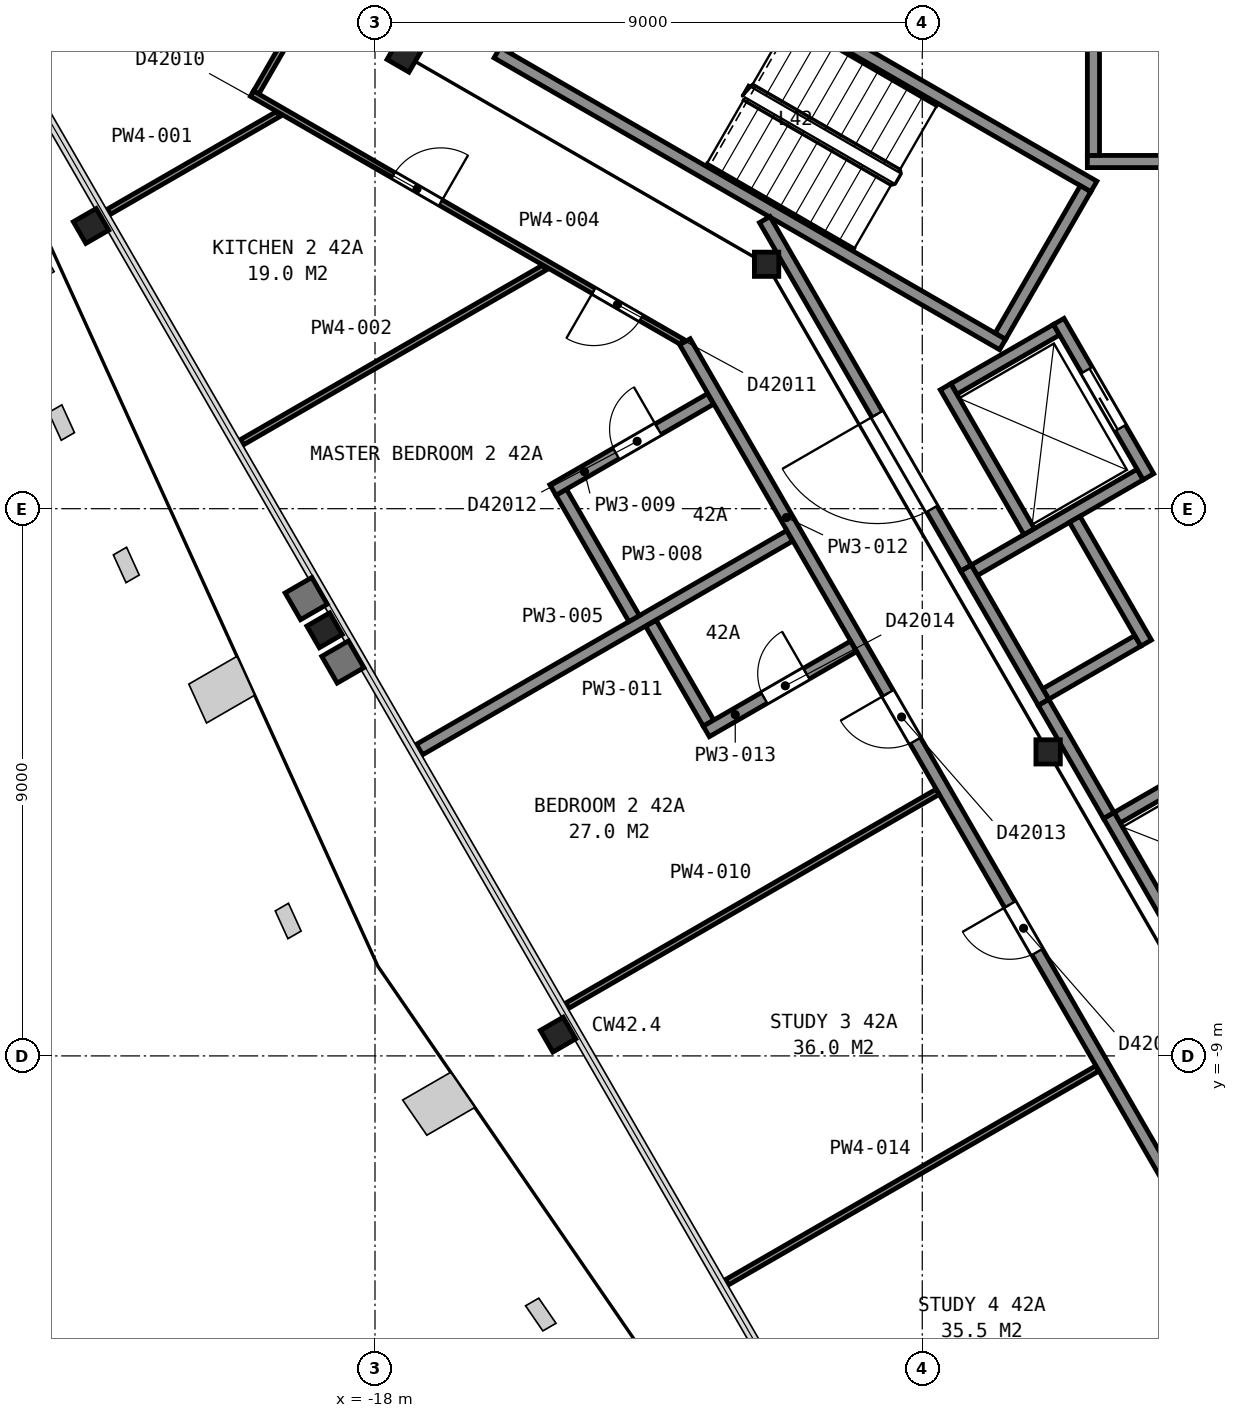
"""IFC4 building model, lengths in metres.
Left out: names, types, materials, properties, quantities, classifications, styles, units other than length and angle.
Written with IfcOpenShell. Run it as: python <this file> out.ifc"""

import sys

from ifc_helpers import new_model, si_unit, direction, frame, frame_2d, origin, origin_2d, place, context, subcontext, project, spatial, rectangle, i_section, extrude, element, fill, save


model = new_model("IFC4")
c1 = context("Model", 3, precision=1e-05, world=origin(), true_north=direction((0.0, 1.0)))
c2 = subcontext(c1, "Body", "Model", "MODEL_VIEW")
j1 = project(units=[si_unit("LENGTHUNIT", "METRE"), si_unit("PLANEANGLEUNIT", "RADIAN")], contexts=[c1])
p1 = place(None, origin())
s1 = spatial("IfcSite", under=j1, at=p1, CompositionType="ELEMENT")
p2 = place(p1, origin())
s2 = spatial("IfcBuilding", under=s1, at=p2, CompositionType="ELEMENT")
p3 = place(p2, frame((0.0, 0.0, 171.0)))
s3 = spatial("IfcBuildingStorey", under=s2, at=p3, CompositionType="ELEMENT", Elevation=171.0)
p4 = place(p3, frame((-22.67, 4.65, 0.0), z_axis=(0.0, 0.0, 1.0), x_axis=(-0.5, 0.866025403784, 0.0)))
e1 = element("IfcColumn", 1, at=p4, inside=s3, PredefinedType="COLUMN", context=c2, shape_type="SweptSolid", body=[
    extrude(i_section(OverallWidth=0.411, OverallDepth=0.434, WebThickness=0.036, FlangeThickness=0.057, FilletRadius=0.015, at=origin_2d()), origin(), (0.0, 0.0, 1.0), 3.66),
])
for number, where, z_axis, x_axis in (
    (2, (-18.83, -2.0, 0.0), (0.0, 0.0, 1.0), (-0.5, 0.866, 0.0)),
    (3, (-14.99, -8.65, 0.0), (0.0, 0.0, 1.0), (-0.5, 0.866, 0.0)),
):
    element("IfcColumn", number, at=place(p3, frame(where, z_axis=z_axis, x_axis=x_axis)), inside=s3, PredefinedType="COLUMN", context=c2, shape_type="SweptSolid", body=[
        extrude(i_section(OverallWidth=0.411, OverallDepth=0.434, WebThickness=0.036, FlangeThickness=0.057, FilletRadius=0.015, at=origin_2d()), origin(), (0.0, 0.0, 1.0), 3.665),
    ])
p5 = place(p3, frame((-17.52, 7.46, 0.0), z_axis=(0.0, 0.0, 1.0), x_axis=(0.5, 0.866025403784, 0.0)))
e4 = element("IfcColumn", 4, at=p5, inside=s3, PredefinedType="COLUMN", context=c2, shape_type="SweptSolid", body=[
    extrude(i_section(OverallWidth=0.406, OverallDepth=0.417, WebThickness=0.03, FlangeThickness=0.048, FilletRadius=0.015, at=origin_2d()), origin(), (0.0, 0.0, 1.0), 3.7),
])
for number, where, z_axis, x_axis in (
    (5, (-11.56, 4.02, 0.0), (0.0, 0.0, 1.0), (1.0, 0.0, 0.0)),
    (6, (-6.93, -4.0, 0.0), (0.0, 0.0, 1.0), (1.0, 0.0, 0.0)),
):
    element("IfcColumn", number, at=place(p3, frame(where, z_axis=z_axis, x_axis=x_axis)), inside=s3, PredefinedType="COLUMN", context=c2, shape_type="SweptSolid", body=[
        extrude(i_section(OverallWidth=0.401, OverallDepth=0.399, WebThickness=0.025, FlangeThickness=0.04, FilletRadius=0.015, at=origin_2d()), origin(), (0.0, 0.0, 1.0), 3.7),
    ])
p6 = place(p3, frame((-14.455, 9.962, 0.0), z_axis=(0.0, 0.0, 1.0), x_axis=(-0.500049511043, -0.865996816683, 0.0)))
e7 = element("IfcWall", 7, at=p6, inside=s3, PredefinedType="PARTITIONING", context=c2, shape_type="SweptSolid", body=[
    extrude(rectangle(XDim=2.8, YDim=0.2, at=frame_2d((1.4, 0.0))), origin(), (0.0, 0.0, 1.0), 3.45),
])
p7 = place(p6, frame((0.85, 0.0, 0.0)))
e8 = element("IfcOpeningElement", 8, at=p7, cuts=e7, PredefinedType="OPENING", context=c2, shape_type="SweptSolid", body=[
    extrude(rectangle(XDim=1.1, YDim=2.1, at=frame_2d((0.55, 1.05))), frame((0.0, 0.11, 0.0), z_axis=(0.0, -1.0, 0.0), x_axis=(1.0, 0.0, 0.0)), (0.0, 0.0, 1.0), 0.22),
])
for number, where, z_axis, x_axis in (
    (9, (-7.678, 2.701, 0.0), (0.0, 0.0, 1.0), (-0.866, 0.5, 0.0)),
    (10, (-6.178, 5.299, 0.0), (0.0, 0.0, 1.0), (-0.866, 0.5, 0.0)),
):
    element("IfcWall", number, at=place(p3, frame(where, z_axis=z_axis, x_axis=x_axis)), inside=s3, PredefinedType="PARTITIONING", context=c2, shape_type="SweptSolid", body=[
        extrude(rectangle(XDim=9.6, YDim=0.2, at=frame_2d((4.8, 0.0))), origin(), (0.0, 0.0, 1.0), 3.45),
    ])
p8 = place(p3, frame((-6.315, 5.262, 0.0), z_axis=(0.0, 0.0, 1.0), x_axis=(-0.500049511043, -0.865996816683, 0.0)))
e11 = element("IfcWall", 11, at=p8, inside=s3, PredefinedType="PARTITIONING", context=c2, shape_type="SweptSolid", body=[
    extrude(rectangle(XDim=2.8, YDim=0.2, at=frame_2d((1.4, 0.0))), origin(), (0.0, 0.0, 1.0), 3.45),
])
p9 = place(p3, frame((-6.285, 5.71, 0.0), z_axis=(0.0, 0.0, 1.0), x_axis=(1.0, 0.0, 0.0)))
e12 = element("IfcWall", 12, at=p9, inside=s3, PredefinedType="PARTITIONING", context=c2, shape_type="SweptSolid", body=[
    extrude(rectangle(XDim=2.35, YDim=0.2, at=frame_2d((1.175, 0.0))), origin(), (0.0, 0.0, 1.0), 3.7),
])
for number, where, z_axis, x_axis in (
    (13, (-5.795, -5.083, 0.0), (0.0, 0.0, 1.0), (0.866, 0.5, 0.0)),
    (14, (-6.97, -3.048, 0.0), (0.0, 0.0, 1.0), (0.866, 0.5, 0.0)),
):
    element("IfcWall", number, at=place(p3, frame(where, z_axis=z_axis, x_axis=x_axis)), inside=s3, PredefinedType="PARTITIONING", context=c2, shape_type="SweptSolid", body=[
        extrude(rectangle(XDim=1.75, YDim=0.2, at=frame_2d((0.875, 0.0))), origin(), (0.0, 0.0, 1.0), 3.7),
    ])
p10 = place(p3, frame((-8.145, -1.013, 0.0), z_axis=(0.0, 0.0, 1.0), x_axis=(0.866016494683, 0.500015430699, 0.0)))
e15 = element("IfcWall", 15, at=p10, inside=s3, PredefinedType="PARTITIONING", context=c2, shape_type="SweptSolid", body=[
    extrude(rectangle(XDim=3.15, YDim=0.2, at=frame_2d((1.575, 0.0))), origin(), (0.0, 0.0, 1.0), 3.7),
])
p11 = place(p3, frame((-8.48, 1.969, 0.0), z_axis=(0.0, 0.0, 1.0), x_axis=(0.866000020948, 0.500043961785, 0.0)))
e16 = element("IfcWall", 16, at=p11, inside=s3, PredefinedType="PARTITIONING", context=c2, shape_type="SweptSolid", body=[
    extrude(rectangle(XDim=1.95, YDim=0.2, at=frame_2d((0.975, 0.0))), origin(), (0.0, 0.0, 1.0), 3.7),
])
p12 = place(p3, frame((-6.185, 5.81, 0.0), z_axis=(0.0, 0.0, 1.0), x_axis=(0.0, 1.0, 0.0)))
e17 = element("IfcWall", 17, at=p12, inside=s3, PredefinedType="PARTITIONING", context=c2, shape_type="SweptSolid", body=[
    extrude(rectangle(XDim=1.75, YDim=0.2, at=frame_2d((0.875, 0.0))), origin(), (0.0, 0.0, 1.0), 3.7),
])
p13 = place(p3, frame((-5.28, 0.525, 0.0), z_axis=(0.0, 0.0, 1.0), x_axis=(-0.500037662692, 0.866003658127, 0.0)))
e18 = element("IfcWall", 18, at=p13, inside=s3, PredefinedType="PARTITIONING", context=c2, shape_type="SweptSolid", body=[
    extrude(rectangle(XDim=2.95, YDim=0.2, at=frame_2d((1.475, 0.0))), origin(), (0.0, 0.0, 1.0), 3.7),
])
p14 = place(p13, frame((0.925, 0.0, 0.0)))
e19 = element("IfcOpeningElement", 19, at=p14, cuts=e18, PredefinedType="OPENING", context=c2, shape_type="SweptSolid", body=[
    extrude(rectangle(XDim=1.1, YDim=2.1, at=frame_2d((0.55, 1.05))), frame((0.0, 0.11, 0.0), z_axis=(0.0, -1.0, 0.0), x_axis=(1.0, 0.0, 0.0)), (0.0, 0.0, 1.0), 0.22),
])
p15 = place(p3, frame((-5.318, -2.21, 0.0), z_axis=(0.0, 0.0, 1.0), x_axis=(-0.499938297808, 0.866061024631, 0.0)))
e20 = element("IfcWall", 20, at=p15, inside=s3, PredefinedType="PARTITIONING", context=c2, shape_type="SweptSolid", body=[
    extrude(rectangle(XDim=2.35, YDim=0.2, at=frame_2d((1.175, 0.0))), origin(), (0.0, 0.0, 1.0), 3.7),
])
p16 = place(p3, frame((-7.242, -0.376, 0.0), z_axis=(0.0, 0.0, 1.0), x_axis=(-0.499996545922, 0.866027397988, 0.0)))
e21 = element("IfcWall", 21, at=p16, inside=s3, PredefinedType="PARTITIONING", context=c2, shape_type="SweptSolid", body=[
    extrude(rectangle(XDim=2.75, YDim=0.2, at=frame_2d((1.375, 0.0))), origin(), (0.0, 0.0, 1.0), 3.7),
])
for number, where, z_axis, x_axis in (
    (22, (-4.656, -7.255, 0.0), (0.0, 0.0, 1.0), (-0.5, 0.866, 0.0)),
    (23, (-7.006, -3.185, 0.0), (0.0, 0.0, 1.0), (-0.5, 0.866, 0.0)),
):
    element("IfcWall", number, at=place(p3, frame(where, z_axis=z_axis, x_axis=x_axis)), inside=s3, PredefinedType="PARTITIONING", context=c2, shape_type="SweptSolid", body=[
        extrude(rectangle(XDim=2.55, YDim=0.2, at=frame_2d((1.275, 0.0))), origin(), (0.0, 0.0, 1.0), 3.7),
    ])
p17 = place(p3, frame((-11.591, 4.755, 0.0), z_axis=(0.0, 0.0, 1.0), x_axis=(0.500043977787, -0.866000011708, 0.0)))
e24 = element("IfcWall", 24, at=p17, inside=s3, PredefinedType="PARTITIONING", context=c2, shape_type="SweptSolid", body=[
    extrude(rectangle(XDim=6.617, YDim=0.2, at=frame_2d((3.308, 0.0))), origin(), (0.0, 0.0, 1.0), 3.45),
])
p18 = place(p17, frame((3.695, 0.0, 0.0)))
e25 = element("IfcOpeningElement", 25, at=p18, cuts=e24, PredefinedType="OPENING", context=c2, shape_type="SweptSolid", body=[
    extrude(rectangle(XDim=1.8, YDim=2.1, at=frame_2d((0.9, 1.05))), frame((0.0, 0.11, 0.0), z_axis=(0.0, -1.0, 0.0), x_axis=(1.0, 0.0, 0.0)), (0.0, 0.0, 1.0), 0.22),
])
p19 = place(p3, frame((-7.005, -3.187, 0.0), z_axis=(0.0, 0.0, 1.0), x_axis=(0.499689606989, -0.866204535123, 0.0)))
e26 = element("IfcWall", 26, at=p19, inside=s3, PredefinedType="PARTITIONING", context=c2, shape_type="SweptSolid", body=[
    extrude(rectangle(XDim=2.145, YDim=0.2, at=frame_2d((1.072, 0.0))), origin(), (0.0, 0.0, 1.0), 3.45),
])
p20 = place(p3, frame((-22.375, 4.885, 0.0), z_axis=(0.0, 0.0, 1.0), x_axis=(0.866164079783, 0.499759729163, 0.0)))
e27 = element("IfcWall", 27, at=p20, inside=s3, PredefinedType="PARTITIONING", context=c2, shape_type="SweptSolid", body=[
    extrude(rectangle(XDim=3.213, YDim=0.1, at=frame_2d((1.606, 0.0))), origin(), (0.0, 0.0, 1.0), 2.713),
])
p21 = place(p3, frame((-20.187, 1.094, 0.0), z_axis=(0.0, 0.0, 1.0), x_axis=(0.866060256018, 0.499939629302, 0.0)))
e28 = element("IfcWall", 28, at=p21, inside=s3, PredefinedType="PARTITIONING", context=c2, shape_type="SweptSolid", body=[
    extrude(rectangle(XDim=5.741, YDim=0.1, at=frame_2d((2.871, 0.0))), origin(), (0.0, 0.0, 1.0), 2.713),
])
p22 = place(p3, frame((-19.955, 6.844, 0.0), z_axis=(0.0, 0.0, 1.0), x_axis=(0.500415732313, 0.865785247537, 0.0)))
e29 = element("IfcWall", 29, at=p22, inside=s3, PredefinedType="PARTITIONING", context=c2, shape_type="SweptSolid", body=[
    extrude(rectangle(XDim=8.097, YDim=0.1, at=frame_2d((4.049, 0.0))), origin(), (0.0, 0.0, 1.0), 2.713),
])
p23 = place(p22, frame((3.45, 0.0, 0.0)))
e30 = element("IfcOpeningElement", 30, at=p23, cuts=e29, PredefinedType="OPENING", context=c2, shape_type="SweptSolid", body=[
    extrude(rectangle(XDim=1.2, YDim=2.1, at=frame_2d((0.6, 1.05))), frame((0.0, 0.06, 0.0), z_axis=(0.0, -1.0, 0.0), x_axis=(1.0, 0.0, 0.0)), (0.0, 0.0, 1.0), 0.12),
])
p24 = place(p3, frame((-12.952, 2.744, 0.0), z_axis=(0.0, 0.0, 1.0), x_axis=(-0.86608949446, 0.499888975259, 0.0)))
e31 = element("IfcWall", 31, at=p24, inside=s3, PredefinedType="PARTITIONING", context=c2, shape_type="SweptSolid", body=[
    extrude(rectangle(XDim=8.165, YDim=0.1, at=frame_2d((4.083, 0.0))), origin(), (0.0, 0.0, 1.0), 2.713),
])
p25 = place(p24, frame((4.581, 0.0, 0.0)))
e32 = element("IfcOpeningElement", 32, at=p25, cuts=e31, PredefinedType="OPENING", context=c2, shape_type="SweptSolid", body=[
    extrude(rectangle(XDim=0.9, YDim=2.1, at=frame_2d((0.45, 1.05))), frame((0.0, 0.06, 0.0), z_axis=(0.0, -1.0, 0.0), x_axis=(1.0, 0.0, 0.0)), (0.0, 0.0, 1.0), 0.12),
])
p26 = place(p24, frame((0.776, 0.0, 0.0)))
e33 = element("IfcOpeningElement", 33, at=p26, cuts=e31, PredefinedType="OPENING", context=c2, shape_type="SweptSolid", body=[
    extrude(rectangle(XDim=0.9, YDim=2.1, at=frame_2d((0.45, 1.05))), frame((0.0, 0.06, 0.0), z_axis=(0.0, -1.0, 0.0), x_axis=(1.0, 0.0, 0.0)), (0.0, 0.0, 1.0), 0.12),
])
p27 = place(p3, frame((-17.268, -3.961, 0.0), z_axis=(0.0, 0.0, 1.0), x_axis=(0.866002795668, 0.500039156363, 0.0)))
e34 = element("IfcWall", 34, at=p27, inside=s3, PredefinedType="PARTITIONING", context=c2, shape_type="SweptSolid", body=[
    extrude(rectangle(XDim=7.029, YDim=0.2, at=frame_2d((3.514, 0.0))), origin(), (0.0, 0.0, 1.0), 2.713),
])
p28 = place(p3, frame((-14.938, 0.271, 0.0), z_axis=(0.0, 0.0, 1.0), x_axis=(0.499913221443, -0.866075499611, 0.0)))
e35 = element("IfcWall", 35, at=p28, inside=s3, PredefinedType="PARTITIONING", context=c2, shape_type="SweptSolid", body=[
    extrude(rectangle(XDim=2.4, YDim=0.2, at=frame_2d((1.2, 0.0))), origin(), (0.0, 0.0, 1.0), 2.713),
])
p29 = place(p3, frame((-12.481, 1.805, 0.0), z_axis=(0.0, 0.0, 1.0), x_axis=(-0.866052556263, -0.499952967579, 0.0)))
e36 = element("IfcWall", 36, at=p29, inside=s3, PredefinedType="PARTITIONING", context=c2, shape_type="SweptSolid", body=[
    extrude(rectangle(XDim=2.995, YDim=0.2, at=frame_2d((1.498, 0.0))), origin(), (0.0, 0.0, 1.0), 2.713),
])
p30 = place(p29, frame((0.995, 0.0, 0.0)))
e37 = element("IfcOpeningElement", 37, at=p30, cuts=e36, PredefinedType="OPENING", context=c2, shape_type="SweptSolid", body=[
    extrude(rectangle(XDim=0.8, YDim=2.1, at=frame_2d((0.4, 1.05))), frame((0.0, 0.11, 0.0), z_axis=(0.0, -1.0, 0.0), x_axis=(1.0, 0.0, 0.0)), (0.0, 0.0, 1.0), 0.22),
])
p31 = place(p3, frame((-14.836, -8.173, 0.0), z_axis=(0.0, 0.0, 1.0), x_axis=(0.866006381746, 0.500032945689, 0.0)))
e38 = element("IfcWall", 38, at=p31, inside=s3, PredefinedType="PARTITIONING", context=c2, shape_type="SweptSolid", body=[
    extrude(rectangle(XDim=7.033, YDim=0.1, at=frame_2d((3.517, 0.0))), origin(), (0.0, 0.0, 1.0), 2.713),
])
p32 = place(p3, frame((-13.462, -1.885, 0.0), z_axis=(0.0, 0.0, 1.0), x_axis=(0.499949193323, -0.866054735046, 0.0)))
e39 = element("IfcWall", 39, at=p32, inside=s3, PredefinedType="PARTITIONING", context=c2, shape_type="SweptSolid", body=[
    extrude(rectangle(XDim=1.895, YDim=0.2, at=frame_2d((0.948, 0.0))), origin(), (0.0, 0.0, 1.0), 2.713),
])
p33 = place(p3, frame((-4.075, -12.545, 0.0), z_axis=(0.0, 0.0, 1.0), x_axis=(-0.499999743747, 0.866025551732, 0.0)))
e40 = element("IfcWall", 40, at=p33, inside=s3, PredefinedType="PARTITIONING", context=c2, shape_type="SweptSolid", body=[
    extrude(rectangle(XDim=17.656, YDim=0.2, at=frame_2d((8.828, 0.0))), origin(), (0.0, 0.0, 1.0), 2.713),
])
p34 = place(p33, frame((10.08, 0.0, 0.0)))
e41 = element("IfcOpeningElement", 41, at=p34, cuts=e40, PredefinedType="OPENING", context=c2, shape_type="SweptSolid", body=[
    extrude(rectangle(XDim=0.9, YDim=2.1, at=frame_2d((0.45, 1.05))), frame((0.0, 0.11, 0.0), z_axis=(0.0, -1.0, 0.0), x_axis=(1.0, 0.0, 0.0)), (0.0, 0.0, 1.0), 0.22),
])
p35 = place(p33, frame((6.068, 0.0, 0.0)))
e42 = element("IfcOpeningElement", 42, at=p35, cuts=e40, PredefinedType="OPENING", context=c2, shape_type="SweptSolid", body=[
    extrude(rectangle(XDim=0.9, YDim=2.1, at=frame_2d((0.45, 1.05))), frame((0.0, 0.11, 0.0), z_axis=(0.0, -1.0, 0.0), x_axis=(1.0, 0.0, 0.0)), (0.0, 0.0, 1.0), 0.22),
])
p36 = place(p3, frame((-12.552, -3.663, 0.0), z_axis=(0.0, 0.0, 1.0), x_axis=(0.866003766563, 0.500037474894, 0.0)))
e43 = element("IfcWall", 43, at=p36, inside=s3, PredefinedType="PARTITIONING", context=c2, shape_type="SweptSolid", body=[
    extrude(rectangle(XDim=2.795, YDim=0.2, at=frame_2d((1.397, 0.0))), origin(), (0.0, 0.0, 1.0), 2.713),
])
p37 = place(p36, frame((1.1, 0.0, 0.0)))
e44 = element("IfcOpeningElement", 44, at=p37, cuts=e43, PredefinedType="OPENING", context=c2, shape_type="SweptSolid", body=[
    extrude(rectangle(XDim=0.8, YDim=2.1, at=frame_2d((0.4, 1.05))), frame((0.0, 0.11, 0.0), z_axis=(0.0, -1.0, 0.0), x_axis=(1.0, 0.0, 0.0)), (0.0, 0.0, 1.0), 0.22),
])
p38 = place(p3, frame((-12.21, -12.722, 0.0), z_axis=(0.0, 0.0, 1.0), x_axis=(0.866002795668, 0.500039156363, 0.0)))
e45 = element("IfcWall", 45, at=p38, inside=s3, PredefinedType="PARTITIONING", context=c2, shape_type="SweptSolid", body=[
    extrude(rectangle(XDim=7.029, YDim=0.1, at=frame_2d((3.514, 0.0))), origin(), (0.0, 0.0, 1.0), 2.713),
])
p39 = place(p14, origin())
e46 = element("IfcDoor", 46, at=p39, inside=s3, OperationType="SLIDING_TO_LEFT", PredefinedType="DOOR", context=c2, shape_type="SweptSolid", body=[
    extrude(rectangle(XDim=1.1, YDim=2.1, at=frame_2d((0.55, 1.05))), frame((0.0, 0.025, 0.0), z_axis=(0.0, -1.0, 0.0), x_axis=(1.0, 0.0, 0.0)), (0.0, 0.0, 1.0), 0.05),
])
fill(e19, e46)
p40 = place(p18, origin())
e47 = element("IfcDoor", 47, at=p40, inside=s3, OperationType="DOUBLE_DOOR_SINGLE_SWING", PredefinedType="DOOR", context=c2, shape_type="SweptSolid", body=[
    extrude(rectangle(XDim=1.8, YDim=2.1, at=frame_2d((0.9, 1.05))), frame((0.0, 0.025, 0.0), z_axis=(0.0, -1.0, 0.0), x_axis=(1.0, 0.0, 0.0)), (0.0, 0.0, 1.0), 0.05),
])
fill(e25, e47)
p41 = place(p25, origin())
e48 = element("IfcDoor", 48, at=p41, inside=s3, OperationType="SINGLE_SWING_LEFT", PredefinedType="DOOR", context=c2, shape_type="SweptSolid", body=[
    extrude(rectangle(XDim=0.9, YDim=2.1, at=frame_2d((0.45, 1.05))), frame((0.0, 0.025, 0.0), z_axis=(0.0, -1.0, 0.0), x_axis=(1.0, 0.0, 0.0)), (0.0, 0.0, 1.0), 0.05),
])
fill(e32, e48)
p42 = place(p26, origin())
e49 = element("IfcDoor", 49, at=p42, inside=s3, OperationType="SINGLE_SWING_RIGHT", PredefinedType="DOOR", context=c2, shape_type="SweptSolid", body=[
    extrude(rectangle(XDim=0.9, YDim=2.1, at=frame_2d((0.45, 1.05))), frame((0.0, 0.025, 0.0), z_axis=(0.0, -1.0, 0.0), x_axis=(1.0, 0.0, 0.0)), (0.0, 0.0, 1.0), 0.05),
])
fill(e33, e49)
p43 = place(p30, origin())
e50 = element("IfcDoor", 50, at=p43, inside=s3, OperationType="SINGLE_SWING_LEFT", PredefinedType="DOOR", context=c2, shape_type="SweptSolid", body=[
    extrude(rectangle(XDim=0.8, YDim=2.1, at=frame_2d((0.4, 1.05))), frame((0.0, 0.025, 0.0), z_axis=(0.0, -1.0, 0.0), x_axis=(1.0, 0.0, 0.0)), (0.0, 0.0, 1.0), 0.05),
])
fill(e37, e50)
p44 = place(p34, origin())
e51 = element("IfcDoor", 51, at=p44, inside=s3, OperationType="SINGLE_SWING_RIGHT", PredefinedType="DOOR", context=c2, shape_type="SweptSolid", body=[
    extrude(rectangle(XDim=0.9, YDim=2.1, at=frame_2d((0.45, 1.05))), frame((0.0, 0.025, 0.0), z_axis=(0.0, -1.0, 0.0), x_axis=(1.0, 0.0, 0.0)), (0.0, 0.0, 1.0), 0.05),
])
fill(e41, e51)
p45 = place(p35, origin())
e52 = element("IfcDoor", 52, at=p45, inside=s3, OperationType="SINGLE_SWING_RIGHT", PredefinedType="DOOR", context=c2, shape_type="SweptSolid", body=[
    extrude(rectangle(XDim=0.9, YDim=2.1, at=frame_2d((0.45, 1.05))), frame((0.0, 0.025, 0.0), z_axis=(0.0, -1.0, 0.0), x_axis=(1.0, 0.0, 0.0)), (0.0, 0.0, 1.0), 0.05),
])
fill(e42, e52)
p46 = place(p37, origin())
e53 = element("IfcDoor", 53, at=p46, inside=s3, OperationType="SINGLE_SWING_RIGHT", PredefinedType="DOOR", context=c2, shape_type="SweptSolid", body=[
    extrude(rectangle(XDim=0.8, YDim=2.1, at=frame_2d((0.4, 1.05))), frame((0.0, 0.025, 0.0), z_axis=(0.0, -1.0, 0.0), x_axis=(1.0, 0.0, 0.0)), (0.0, 0.0, 1.0), 0.05),
])
fill(e44, e53)
save(model, sys.argv[1])
